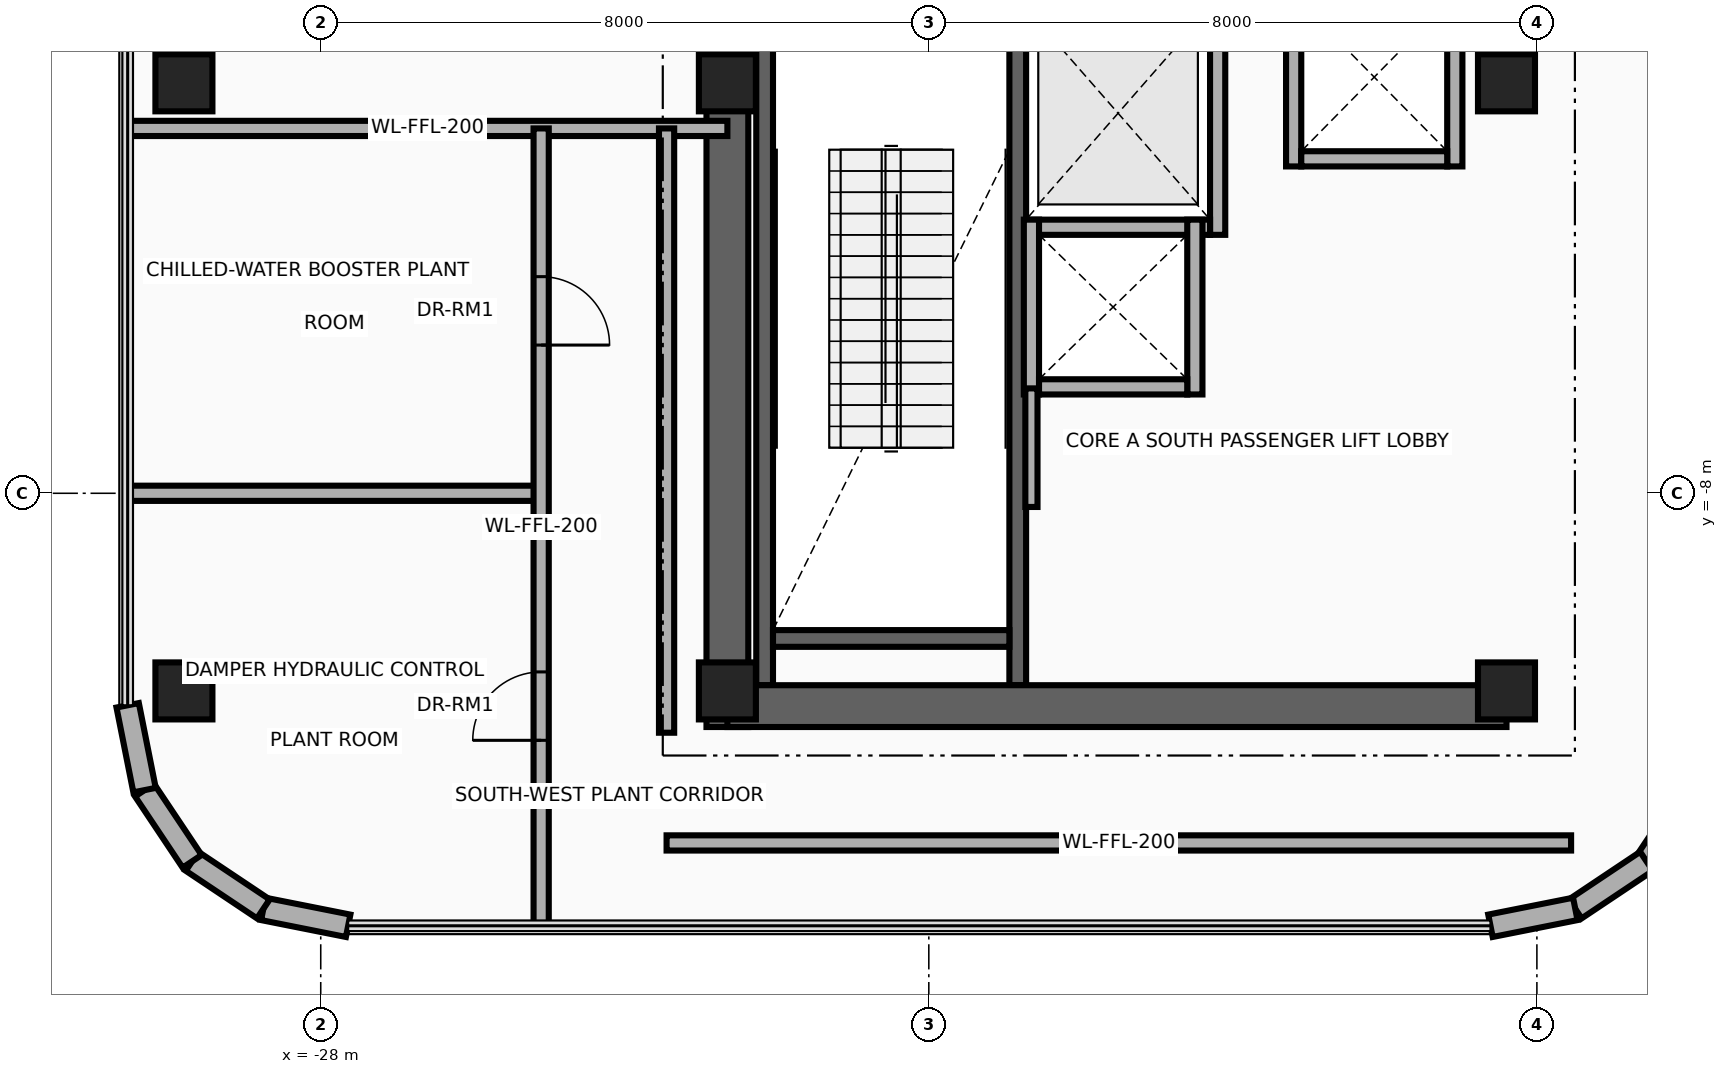
"""IFC4 building model, lengths in metres.
Left out: names, types, materials, properties, quantities, classifications, styles, units other than length and angle.
Written with IfcOpenShell. Run it as: python <this file> out.ifc"""

import sys

from ifc_helpers import new_model, si_unit, direction, frame, frame_2d, origin, origin_2d, place, context, subcontext, project, spatial, rectangle, extrude, source, transform, mapped, element, fill, save


model = new_model("IFC4")
c1 = context("Model", 3, precision=1e-05, world=origin(), true_north=direction((0.0, 1.0)))
c2 = subcontext(c1, "Body", "Model", "MODEL_VIEW")
j1 = project(units=[si_unit("LENGTHUNIT", "METRE"), si_unit("PLANEANGLEUNIT", "RADIAN")], contexts=[c1])
p1 = place(None, origin())
s1 = spatial("IfcSite", under=j1, at=p1, CompositionType="ELEMENT")
p2 = place(p1, origin())
s2 = spatial("IfcBuilding", under=s1, at=p2, CompositionType="ELEMENT")
p3 = place(p2, frame((0.0, 0.0, 294.2)))
s3 = spatial("IfcBuildingStorey", under=s2, at=p3, CompositionType="ELEMENT", Elevation=294.2)
for number, where, z_axis, x_axis in (
    (1, (-22.16, -10.525, 0.0), (0.0, 0.0, 1.0), (0.0, 1.0, 0.0)),
    (2, (-18.83, -10.525, 0.0), (0.0, 0.0, 1.0), (0.0, 1.0, 0.0)),
):
    element("IfcWall", number, at=place(p3, frame(where, z_axis=z_axis, x_axis=x_axis)), inside=s3, PredefinedType="SHEAR", context=c2, shape_type="SweptSolid", body=[
        extrude(rectangle(XDim=8.745, YDim=0.22, at=frame_2d((4.373, 0.0))), origin(), (0.0, 0.0, 1.0), 4.96),
    ])
p4 = place(p3, frame((-22.05, -9.91, 0.0), z_axis=(0.0, 0.0, 1.0), x_axis=(1.0, 0.0, 0.0)))
e3 = element("IfcWall", 3, at=p4, inside=s3, PredefinedType="SHEAR", context=c2, shape_type="SweptSolid", body=[
    extrude(rectangle(XDim=3.11, YDim=0.22, at=frame_2d((1.555, 0.0))), origin(), (0.0, 0.0, 1.0), 4.96),
])
p5 = place(p3, frame((-22.65, -11.075, 0.0), z_axis=(0.0, 0.0, 1.0), x_axis=(0.0, 1.0, 0.0)))
e4 = element("IfcWall", 4, at=p5, inside=s3, PredefinedType="SHEAR", context=c2, shape_type="SweptSolid", body=[
    extrude(rectangle(XDim=22.15, YDim=0.55, at=frame_2d((11.075, 0.0))), origin(), (0.0, 0.0, 1.0), 4.96),
])
p6 = place(p3, frame((-22.65, -10.8, 0.0), z_axis=(0.0, 0.0, 1.0), x_axis=(1.0, 0.0, 0.0)))
e5 = element("IfcWall", 5, at=p6, inside=s3, PredefinedType="SHEAR", context=c2, shape_type="SweptSolid", body=[
    extrude(rectangle(XDim=10.25, YDim=0.55, at=frame_2d((5.125, 0.0))), origin(), (0.0, 0.0, 1.0), 4.96),
])
m1 = source(origin(), c2, "Body", "SweptSolid", [
    extrude(rectangle(XDim=0.75, YDim=0.75, at=origin_2d()), origin(), (0.0, 0.0, 1.0), 5.2),
])
for number, where, z_axis, x_axis in (
    (6, (-29.8, -10.6, 0.0), (0.0, 0.0, 1.0), (1.0, 0.0, 0.0)),
    (7, (-22.65, -10.6, 0.0), (0.0, 0.0, 1.0), (1.0, 0.0, 0.0)),
    (8, (-12.4, -10.6, 0.0), (0.0, 0.0, 1.0), (1.0, 0.0, 0.0)),
    (9, (-29.8, -2.6, 0.0), (0.0, 0.0, 1.0), (1.0, 0.0, 0.0)),
    (10, (-22.65, -2.6, 0.0), (0.0, 0.0, 1.0), (1.0, 0.0, 0.0)),
    (11, (-12.4, -2.6, 0.0), (0.0, 0.0, 1.0), (1.0, 0.0, 0.0)),
):
    element("IfcColumn", number, at=place(p3, frame(where, z_axis=z_axis, x_axis=x_axis)), inside=s3, PredefinedType="COLUMN", context=c2, shape_type="MappedRepresentation", body=[
        mapped(m1, transform((0.0, 0.0, 0.0), x_axis=(1.0, 0.0, 0.0), y_axis=(0.0, 1.0, 0.0), z_axis=(0.0, 0.0, 1.0), scale=1.0)),
    ])
for number, where, z_axis, x_axis in (
    (12, (-9.932, -11.905, 0.0), (0.0, 0.0, 1.0), (-0.556, -0.831, 0.0)),
    (13, (-10.558, -12.842, 0.0), (0.0, 0.0, 1.0), (-0.831, -0.556, 0.0)),
):
    element("IfcWall", number, at=place(p3, frame(where, z_axis=z_axis, x_axis=x_axis)), inside=s3, PredefinedType="SOLIDWALL", context=c2, shape_type="SweptSolid", body=[
        extrude(rectangle(XDim=1.127, YDim=0.3, at=frame_2d((0.563, 0.0))), origin(), (0.0, 0.0, 1.0), 4.96),
    ])
for number, where, z_axis, x_axis in (
    (14, (-11.495, -13.468, 0.0), (0.0, 0.0, 1.0), (-0.981, -0.195, 0.0)),
    (15, (-27.639, -13.69, 0.0), (0.0, 0.0, 1.0), (-0.981, 0.195, 0.0)),
):
    element("IfcWall", number, at=place(p3, frame(where, z_axis=z_axis, x_axis=x_axis)), inside=s3, PredefinedType="SOLIDWALL", context=c2, shape_type="SweptSolid", body=[
        extrude(rectangle(XDim=1.138, YDim=0.3, at=frame_2d((0.569, 0.0))), origin(), (0.0, 0.0, 1.0), 4.96),
    ])
for number, where, z_axis, x_axis in (
    (16, (-28.755, -13.468, 0.0), (0.0, 0.0, 1.0), (-0.831, 0.556, 0.0)),
    (17, (-29.692, -12.842, 0.0), (0.0, 0.0, 1.0), (-0.556, 0.831, 0.0)),
):
    element("IfcWall", number, at=place(p3, frame(where, z_axis=z_axis, x_axis=x_axis)), inside=s3, PredefinedType="SOLIDWALL", context=c2, shape_type="SweptSolid", body=[
        extrude(rectangle(XDim=1.127, YDim=0.3, at=frame_2d((0.563, 0.0))), origin(), (0.0, 0.0, 1.0), 4.96),
    ])
p7 = place(p3, frame((-30.318, -11.905, 0.0), z_axis=(0.0, 0.0, 1.0), x_axis=(-0.195043173023, 0.980794657743, 0.0)))
e18 = element("IfcWall", 18, at=p7, inside=s3, PredefinedType="SOLIDWALL", context=c2, shape_type="SweptSolid", body=[
    extrude(rectangle(XDim=1.138, YDim=0.3, at=frame_2d((0.569, 0.0))), origin(), (0.0, 0.0, 1.0), 4.96),
])
p8 = place(p3, frame((-16.2, -4.6, 0.0), z_axis=(0.0, 0.0, 1.0), x_axis=(0.0, 1.0, 0.0)))
e19 = element("IfcWall", 19, at=p8, inside=s3, PredefinedType="MOVABLE", context=c2, shape_type="SweptSolid", body=[
    extrude(rectangle(XDim=3.2, YDim=0.2, at=frame_2d((1.6, 0.0))), origin(), (0.0, 0.0, 1.0), 4.96),
])
p9 = place(p3, frame((-18.72, -4.5, 0.0), z_axis=(0.0, 0.0, 1.0), x_axis=(1.0, 0.0, 0.0)))
e20 = element("IfcWall", 20, at=p9, inside=s3, PredefinedType="MOVABLE", context=c2, shape_type="SweptSolid", body=[
    extrude(rectangle(XDim=2.42, YDim=0.2, at=frame_2d((1.21, 0.0))), origin(), (0.0, 0.0, 1.0), 4.96),
])
for number, where, z_axis, x_axis in (
    (21, (-18.65, -6.7, 0.0), (0.0, 0.0, 1.0), (0.0, 1.0, 0.0)),
    (22, (-16.5, -6.7, 0.0), (0.0, 0.0, 1.0), (0.0, 1.0, 0.0)),
):
    element("IfcWall", number, at=place(p3, frame(where, z_axis=z_axis, x_axis=x_axis)), inside=s3, PredefinedType="MOVABLE", context=c2, shape_type="SweptSolid", body=[
        extrude(rectangle(XDim=2.3, YDim=0.2, at=frame_2d((1.15, 0.0))), origin(), (0.0, 0.0, 1.0), 4.96),
    ])
p10 = place(p3, frame((-18.55, -6.6, 0.0), z_axis=(0.0, 0.0, 1.0), x_axis=(1.0, 0.0, 0.0)))
e23 = element("IfcWall", 23, at=p10, inside=s3, PredefinedType="MOVABLE", context=c2, shape_type="SweptSolid", body=[
    extrude(rectangle(XDim=1.95, YDim=0.2, at=frame_2d((0.975, 0.0))), origin(), (0.0, 0.0, 1.0), 4.96),
])
for number, where, z_axis, x_axis in (
    (24, (-15.2, -3.7, 0.0), (0.0, 0.0, 1.0), (0.0, 1.0, 0.0)),
    (25, (-13.08, -3.7, 0.0), (0.0, 0.0, 1.0), (0.0, 1.0, 0.0)),
):
    element("IfcWall", number, at=place(p3, frame(where, z_axis=z_axis, x_axis=x_axis)), inside=s3, PredefinedType="MOVABLE", context=c2, shape_type="SweptSolid", body=[
        extrude(rectangle(XDim=2.35, YDim=0.2, at=frame_2d((1.175, 0.0))), origin(), (0.0, 0.0, 1.0), 4.96),
    ])
p11 = place(p3, frame((-15.1, -3.6, 0.0), z_axis=(0.0, 0.0, 1.0), x_axis=(1.0, 0.0, 0.0)))
e26 = element("IfcWall", 26, at=p11, inside=s3, PredefinedType="MOVABLE", context=c2, shape_type="SweptSolid", body=[
    extrude(rectangle(XDim=1.92, YDim=0.2, at=frame_2d((0.96, 0.0))), origin(), (0.0, 0.0, 1.0), 4.96),
])
p12 = place(p3, frame((-18.65, -8.18, 0.0), z_axis=(0.0, 0.0, 1.0), x_axis=(0.0, 1.0, 0.0)))
e27 = element("IfcWall", 27, at=p12, inside=s3, PredefinedType="PARTITIONING", context=c2, shape_type="SweptSolid", body=[
    extrude(rectangle(XDim=1.56, YDim=0.16, at=frame_2d((0.78, 0.0))), origin(), (0.0, 0.0, 1.0), 4.96),
])
p13 = place(p3, frame((-30.54, -3.2, 0.0), z_axis=(0.0, 0.0, 1.0), x_axis=(1.0, 0.0, 0.0)))
e28 = element("IfcWall", 28, at=p13, inside=s3, PredefinedType="PARTITIONING", context=c2, shape_type="SweptSolid", body=[
    extrude(rectangle(XDim=7.89, YDim=0.2, at=frame_2d((3.945, 0.0))), origin(), (0.0, 0.0, 1.0), 4.334),
])
p14 = place(p3, frame((-23.45, -12.6, 0.0), z_axis=(0.0, 0.0, 1.0), x_axis=(1.0, 0.0, 0.0)))
e29 = element("IfcWall", 29, at=p14, inside=s3, PredefinedType="PARTITIONING", context=c2, shape_type="SweptSolid", body=[
    extrude(rectangle(XDim=11.9, YDim=0.2, at=frame_2d((5.95, 0.0))), origin(), (0.0, 0.0, 1.0), 4.96),
])
p15 = place(p3, frame((-30.54, -8.0, 0.0), z_axis=(0.0, 0.0, 1.0), x_axis=(1.0, 0.0, 0.0)))
e30 = element("IfcWall", 30, at=p15, inside=s3, PredefinedType="PARTITIONING", context=c2, shape_type="SweptSolid", body=[
    extrude(rectangle(XDim=5.44, YDim=0.2, at=frame_2d((2.72, 0.0))), origin(), (0.0, 0.0, 1.0), 4.406),
])
p16 = place(p3, frame((-23.45, -11.15, 0.0), z_axis=(0.0, 0.0, 1.0), x_axis=(0.0, 1.0, 0.0)))
e31 = element("IfcWall", 31, at=p16, inside=s3, PredefinedType="PARTITIONING", context=c2, shape_type="SweptSolid", body=[
    extrude(rectangle(XDim=7.95, YDim=0.2, at=frame_2d((3.975, 0.0))), origin(), (0.0, 0.0, 1.0), 4.323),
])
p17 = place(p3, frame((-25.1, -13.69, 0.0), z_axis=(0.0, 0.0, 1.0), x_axis=(0.0, 1.0, 0.0)))
e32 = element("IfcWall", 32, at=p17, inside=s3, PredefinedType="PARTITIONING", context=c2, shape_type="SweptSolid", body=[
    extrude(rectangle(XDim=10.49, YDim=0.2, at=frame_2d((5.245, 0.0))), origin(), (0.0, 0.0, 1.0), 4.323),
])
p18 = place(p17, frame((2.44, 0.0, 0.0)))
e33 = element("IfcOpeningElement", 33, at=p18, cuts=e32, PredefinedType="OPENING", context=c2, shape_type="SweptSolid", body=[
    extrude(rectangle(XDim=0.9, YDim=2.1, at=frame_2d((0.45, 1.05))), frame((0.0, 0.115, 0.0), z_axis=(0.0, -1.0, 0.0), x_axis=(1.0, 0.0, 0.0)), (0.0, 0.0, 1.0), 0.23),
])
p19 = place(p17, frame((7.64, 0.0, 0.0)))
e34 = element("IfcOpeningElement", 34, at=p19, cuts=e32, PredefinedType="OPENING", context=c2, shape_type="SweptSolid", body=[
    extrude(rectangle(XDim=0.9, YDim=2.1, at=frame_2d((0.45, 1.05))), frame((0.0, 0.115, 0.0), z_axis=(0.0, -1.0, 0.0), x_axis=(1.0, 0.0, 0.0)), (0.0, 0.0, 1.0), 0.23),
])
p20 = place(p18, origin())
e35 = element("IfcDoor", 35, at=p20, inside=s3, OperationType="SINGLE_SWING_RIGHT", PredefinedType="DOOR", context=c2, shape_type="SweptSolid", body=[
    extrude(rectangle(XDim=0.9, YDim=2.1, at=frame_2d((0.45, 1.05))), frame((0.0, 0.025, 0.0), z_axis=(0.0, -1.0, 0.0), x_axis=(1.0, 0.0, 0.0)), (0.0, 0.0, 1.0), 0.05),
])
fill(e33, e35)
p21 = place(p19, frame((0.9, 0.0, 0.0), z_axis=(0.0, 0.0, 1.0), x_axis=(-1.0, 0.0, 0.0)))
e36 = element("IfcDoor", 36, at=p21, inside=s3, OperationType="SINGLE_SWING_LEFT", PredefinedType="DOOR", context=c2, shape_type="SweptSolid", body=[
    extrude(rectangle(XDim=0.9, YDim=2.1, at=frame_2d((0.45, 1.05))), frame((0.0, 0.025, 0.0), z_axis=(0.0, -1.0, 0.0), x_axis=(1.0, 0.0, 0.0)), (0.0, 0.0, 1.0), 0.05),
])
fill(e34, e36)
save(model, sys.argv[1])
